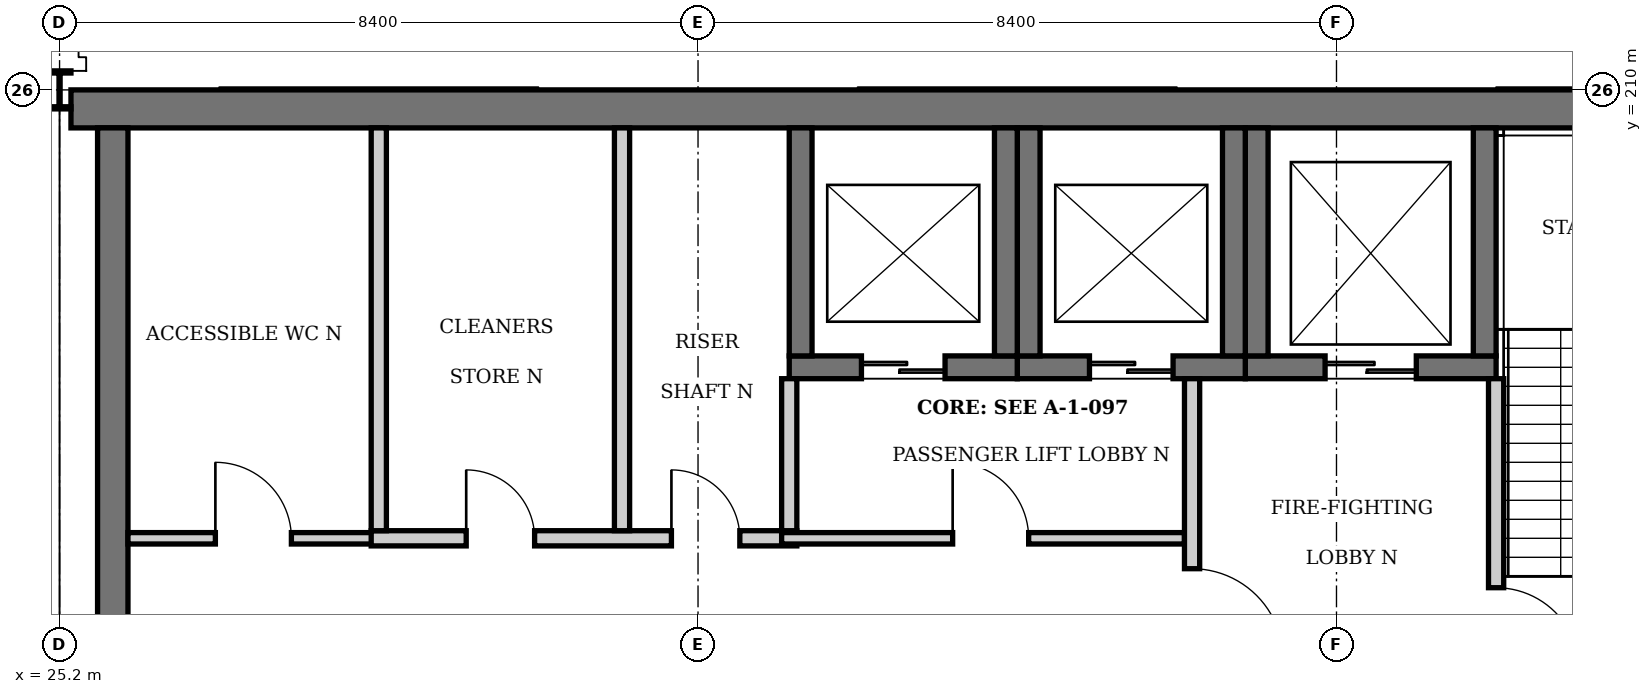
"""IFC4 building model, lengths in metres.
Left out: names, types, materials, properties, quantities, classifications, styles, units other than length and angle.
Written with IfcOpenShell. Run it as: python <this file> out.ifc"""

import sys

from ifc_helpers import new_model, si_unit, direction, frame, frame_2d, origin, origin_2d, place, context, subcontext, project, spatial, rectangle, i_section, extrude, element, fill, save


model = new_model("IFC4")
c1 = context("Model", 3, precision=1e-05, world=origin(), true_north=direction((0.0, 1.0)))
c2 = subcontext(c1, "Body", "Model", "MODEL_VIEW")
j1 = project(units=[si_unit("LENGTHUNIT", "METRE"), si_unit("PLANEANGLEUNIT", "RADIAN")], contexts=[c1])
p1 = place(None, origin())
s1 = spatial("IfcSite", under=j1, at=p1, CompositionType="ELEMENT")
p2 = place(p1, origin())
s2 = spatial("IfcBuilding", under=s1, at=p2, CompositionType="ELEMENT")
p3 = place(p2, frame((0.0, 0.0, 6.0)))
s3 = spatial("IfcBuildingStorey", under=s2, at=p3, CompositionType="ELEMENT", Elevation=6.0)
p4 = place(p3, frame((25.2, 210.0, 0.0), z_axis=(0.0, 0.0, 1.0), x_axis=(1.0, 0.0, 0.0)))
e1 = element("IfcColumn", 1, at=p4, inside=s3, PredefinedType="COLUMN", context=c2, shape_type="SweptSolid", body=[
    extrude(i_section(OverallWidth=0.3, OverallDepth=0.5, WebThickness=0.014, FlangeThickness=0.028, at=origin_2d()), origin(), (0.0, 0.0, 1.0), 4.8),
])
p5 = place(p3, frame((25.35, 209.75, 0.0), z_axis=(0.0, 0.0, 1.0), x_axis=(1.0, 0.0, 0.0)))
e2 = element("IfcWall", 2, at=p5, inside=s3, PredefinedType="SHEAR", context=c2, shape_type="SweptSolid", body=[
    extrude(rectangle(XDim=25.043, YDim=0.5, at=frame_2d((12.521, 0.0))), origin(), (0.0, 0.0, 1.0), 4.8),
])
p6 = place(p3, frame((25.9, 202.1, 0.0), z_axis=(0.0, 0.0, 1.0), x_axis=(0.0, 1.0, 0.0)))
e3 = element("IfcWall", 3, at=p6, inside=s3, PredefinedType="SHEAR", context=c2, shape_type="SweptSolid", body=[
    extrude(rectangle(XDim=7.4, YDim=0.4, at=frame_2d((3.7, 0.0))), origin(), (0.0, 0.0, 1.0), 4.8),
])
p7 = place(p3, frame((40.8, 206.35, 0.0), z_axis=(0.0, 0.0, 1.0), x_axis=(1.0, 0.0, 0.0)))
e4 = element("IfcWall", 4, at=p7, inside=s3, PredefinedType="SHEAR", context=c2, shape_type="SweptSolid", body=[
    extrude(rectangle(XDim=3.3, YDim=0.3, at=frame_2d((1.65, 0.0))), origin(), (0.0, 0.0, 1.0), 4.8),
])
p8 = place(p7, frame((1.05, 0.0, 0.0)))
e5 = element("IfcOpeningElement", 5, at=p8, cuts=e4, PredefinedType="OPENING", context=c2, shape_type="SweptSolid", body=[
    extrude(rectangle(XDim=1.2, YDim=2.1, at=frame_2d((0.6, 1.05))), frame((0.0, 0.16, 0.0), z_axis=(0.0, -1.0, 0.0), x_axis=(1.0, 0.0, 0.0)), (0.0, 0.0, 1.0), 0.32),
])
for number, where, z_axis, x_axis in (
    (6, (43.95, 206.5, 0.0), (0.0, 0.0, 1.0), (0.0, 1.0, 0.0)),
    (7, (40.95, 206.5, 0.0), (0.0, 0.0, 1.0), (0.0, 1.0, 0.0)),
):
    element("IfcWall", number, at=place(p3, frame(where, z_axis=z_axis, x_axis=x_axis)), inside=s3, PredefinedType="SHEAR", context=c2, shape_type="SweptSolid", body=[
        extrude(rectangle(XDim=3.0, YDim=0.3, at=frame_2d((1.5, 0.0))), origin(), (0.0, 0.0, 1.0), 4.8),
    ])
p9 = place(p3, frame((37.8, 206.35, 0.0), z_axis=(0.0, 0.0, 1.0), x_axis=(1.0, 0.0, 0.0)))
e8 = element("IfcWall", 8, at=p9, inside=s3, PredefinedType="SHEAR", context=c2, shape_type="SweptSolid", body=[
    extrude(rectangle(XDim=3.0, YDim=0.3, at=frame_2d((1.5, 0.0))), origin(), (0.0, 0.0, 1.0), 4.8),
])
p10 = place(p9, frame((0.95, 0.0, 0.0)))
e9 = element("IfcOpeningElement", 9, at=p10, cuts=e8, PredefinedType="OPENING", context=c2, shape_type="SweptSolid", body=[
    extrude(rectangle(XDim=1.1, YDim=2.1, at=frame_2d((0.55, 1.05))), frame((0.0, 0.16, 0.0), z_axis=(0.0, -1.0, 0.0), x_axis=(1.0, 0.0, 0.0)), (0.0, 0.0, 1.0), 0.32),
])
for number, where, z_axis, x_axis in (
    (10, (40.65, 206.5, 0.0), (0.0, 0.0, 1.0), (0.0, 1.0, 0.0)),
    (11, (37.95, 206.5, 0.0), (0.0, 0.0, 1.0), (0.0, 1.0, 0.0)),
):
    element("IfcWall", number, at=place(p3, frame(where, z_axis=z_axis, x_axis=x_axis)), inside=s3, PredefinedType="SHEAR", context=c2, shape_type="SweptSolid", body=[
        extrude(rectangle(XDim=3.0, YDim=0.3, at=frame_2d((1.5, 0.0))), origin(), (0.0, 0.0, 1.0), 4.8),
    ])
p11 = place(p3, frame((34.8, 206.35, 0.0), z_axis=(0.0, 0.0, 1.0), x_axis=(1.0, 0.0, 0.0)))
e12 = element("IfcWall", 12, at=p11, inside=s3, PredefinedType="SHEAR", context=c2, shape_type="SweptSolid", body=[
    extrude(rectangle(XDim=3.0, YDim=0.3, at=frame_2d((1.5, 0.0))), origin(), (0.0, 0.0, 1.0), 4.8),
])
p12 = place(p11, frame((0.95, 0.0, 0.0)))
e13 = element("IfcOpeningElement", 13, at=p12, cuts=e12, PredefinedType="OPENING", context=c2, shape_type="SweptSolid", body=[
    extrude(rectangle(XDim=1.1, YDim=2.1, at=frame_2d((0.55, 1.05))), frame((0.0, 0.16, 0.0), z_axis=(0.0, -1.0, 0.0), x_axis=(1.0, 0.0, 0.0)), (0.0, 0.0, 1.0), 0.32),
])
for number, where, z_axis, x_axis in (
    (14, (37.65, 206.5, 0.0), (0.0, 0.0, 1.0), (0.0, 1.0, 0.0)),
    (15, (34.95, 206.5, 0.0), (0.0, 0.0, 1.0), (0.0, 1.0, 0.0)),
):
    element("IfcWall", number, at=place(p3, frame(where, z_axis=z_axis, x_axis=x_axis)), inside=s3, PredefinedType="SHEAR", context=c2, shape_type="SweptSolid", body=[
        extrude(rectangle(XDim=3.0, YDim=0.3, at=frame_2d((1.5, 0.0))), origin(), (0.0, 0.0, 1.0), 4.8),
    ])
p13 = place(p3, frame((26.1, 204.1, 0.0), z_axis=(0.0, 0.0, 1.0), x_axis=(1.0, 0.0, 0.0)))
e16 = element("IfcWall", 16, at=p13, inside=s3, PredefinedType="PARTITIONING", context=c2, shape_type="SweptSolid", body=[
    extrude(rectangle(XDim=3.4, YDim=0.15, at=frame_2d((1.7, 0.0))), origin(), (0.0, 0.0, 1.0), 4.55),
])
p14 = place(p13, frame((1.15, 0.0, 0.0)))
e17 = element("IfcOpeningElement", 17, at=p14, cuts=e16, PredefinedType="OPENING", context=c2, shape_type="SweptSolid", body=[
    extrude(rectangle(XDim=1.0, YDim=2.1, at=frame_2d((0.5, 1.05))), frame((0.0, 0.085, 0.0), z_axis=(0.0, -1.0, 0.0), x_axis=(1.0, 0.0, 0.0)), (0.0, 0.0, 1.0), 0.17),
])
p15 = place(p3, frame((29.3, 204.1, 0.0), z_axis=(0.0, 0.0, 1.0), x_axis=(1.0, 0.0, 0.0)))
e18 = element("IfcWall", 18, at=p15, inside=s3, PredefinedType="PARTITIONING", context=c2, shape_type="SweptSolid", body=[
    extrude(rectangle(XDim=5.6, YDim=0.2, at=frame_2d((2.8, 0.0))), origin(), (0.0, 0.0, 1.0), 4.55),
])
p16 = place(p15, frame((3.95, 0.0, 0.0)))
e19 = element("IfcOpeningElement", 19, at=p16, cuts=e18, PredefinedType="OPENING", context=c2, shape_type="SweptSolid", body=[
    extrude(rectangle(XDim=0.9, YDim=2.1, at=frame_2d((0.45, 1.05))), frame((0.0, 0.11, 0.0), z_axis=(0.0, -1.0, 0.0), x_axis=(1.0, 0.0, 0.0)), (0.0, 0.0, 1.0), 0.22),
])
p17 = place(p15, frame((1.25, 0.0, 0.0)))
e20 = element("IfcOpeningElement", 20, at=p17, cuts=e18, PredefinedType="OPENING", context=c2, shape_type="SweptSolid", body=[
    extrude(rectangle(XDim=0.9, YDim=2.1, at=frame_2d((0.45, 1.05))), frame((0.0, 0.11, 0.0), z_axis=(0.0, -1.0, 0.0), x_axis=(1.0, 0.0, 0.0)), (0.0, 0.0, 1.0), 0.22),
])
p18 = place(p3, frame((34.7, 204.1, 0.0), z_axis=(0.0, 0.0, 1.0), x_axis=(1.0, 0.0, 0.0)))
e21 = element("IfcWall", 21, at=p18, inside=s3, PredefinedType="PARTITIONING", context=c2, shape_type="SweptSolid", body=[
    extrude(rectangle(XDim=5.3, YDim=0.15, at=frame_2d((2.65, 0.0))), origin(), (0.0, 0.0, 1.0), 4.55),
])
p19 = place(p18, frame((2.25, 0.0, 0.0)))
e22 = element("IfcOpeningElement", 22, at=p19, cuts=e21, PredefinedType="OPENING", context=c2, shape_type="SweptSolid", body=[
    extrude(rectangle(XDim=1.0, YDim=2.1, at=frame_2d((0.5, 1.05))), frame((0.0, 0.085, 0.0), z_axis=(0.0, -1.0, 0.0), x_axis=(1.0, 0.0, 0.0)), (0.0, 0.0, 1.0), 0.17),
])
for number, where, z_axis, x_axis in (
    (23, (29.4, 204.2, 0.0), (0.0, 0.0, 1.0), (0.0, 1.0, 0.0)),
    (24, (32.6, 204.2, 0.0), (0.0, 0.0, 1.0), (0.0, 1.0, 0.0)),
):
    element("IfcWall", number, at=place(p3, frame(where, z_axis=z_axis, x_axis=x_axis)), inside=s3, PredefinedType="PARTITIONING", context=c2, shape_type="SweptSolid", body=[
        extrude(rectangle(XDim=5.3, YDim=0.2, at=frame_2d((2.65, 0.0))), origin(), (0.0, 0.0, 1.0), 4.55),
    ])
p20 = place(p3, frame((34.8, 204.2, 0.0), z_axis=(0.0, 0.0, 1.0), x_axis=(0.0, 1.0, 0.0)))
e25 = element("IfcWall", 25, at=p20, inside=s3, PredefinedType="PARTITIONING", context=c2, shape_type="SweptSolid", body=[
    extrude(rectangle(XDim=2.0, YDim=0.2, at=frame_2d((1.0, 0.0))), origin(), (0.0, 0.0, 1.0), 4.55),
])
p21 = place(p3, frame((40.1, 202.1, 0.0), z_axis=(0.0, 0.0, 1.0), x_axis=(0.0, 1.0, 0.0)))
e26 = element("IfcWall", 26, at=p21, inside=s3, PredefinedType="PARTITIONING", context=c2, shape_type="SweptSolid", body=[
    extrude(rectangle(XDim=4.1, YDim=0.2, at=frame_2d((2.05, 0.0))), origin(), (0.0, 0.0, 1.0), 4.55),
])
p22 = place(p21, frame((0.4, 0.0, 0.0)))
e27 = element("IfcOpeningElement", 27, at=p22, cuts=e26, PredefinedType="OPENING", context=c2, shape_type="SweptSolid", body=[
    extrude(rectangle(XDim=1.2, YDim=2.4, at=frame_2d((0.6, 1.2))), frame((0.0, 0.11, 0.0), z_axis=(0.0, -1.0, 0.0), x_axis=(1.0, 0.0, 0.0)), (0.0, 0.0, 1.0), 0.22),
])
p23 = place(p3, frame((44.1, 202.1, 0.0), z_axis=(0.0, 0.0, 1.0), x_axis=(0.0, 1.0, 0.0)))
e28 = element("IfcWall", 28, at=p23, inside=s3, PredefinedType="PARTITIONING", context=c2, shape_type="SweptSolid", body=[
    extrude(rectangle(XDim=4.1, YDim=0.2, at=frame_2d((2.05, 0.0))), origin(), (0.0, 0.0, 1.0), 4.55),
])
p24 = place(p23, frame((0.25, 0.0, 0.0)))
e29 = element("IfcOpeningElement", 29, at=p24, cuts=e28, PredefinedType="OPENING", context=c2, shape_type="SweptSolid", body=[
    extrude(rectangle(XDim=1.1, YDim=2.4, at=frame_2d((0.55, 1.2))), frame((0.0, 0.11, 0.0), z_axis=(0.0, -1.0, 0.0), x_axis=(1.0, 0.0, 0.0)), (0.0, 0.0, 1.0), 0.22),
])
p25 = place(p19, origin())
e30 = element("IfcDoor", 30, at=p25, inside=s3, OperationType="SINGLE_SWING_LEFT", PredefinedType="DOOR", context=c2, shape_type="SweptSolid", body=[
    extrude(rectangle(XDim=1.0, YDim=2.1, at=frame_2d((0.5, 1.05))), frame((0.0, 0.025, 0.0), z_axis=(0.0, -1.0, 0.0), x_axis=(1.0, 0.0, 0.0)), (0.0, 0.0, 1.0), 0.05),
])
fill(e22, e30)
p26 = place(p22, frame((1.2, 0.0, 0.0), z_axis=(0.0, 0.0, 1.0), x_axis=(-1.0, 0.0, 0.0)))
e31 = element("IfcDoor", 31, at=p26, inside=s3, OperationType="SINGLE_SWING_RIGHT", PredefinedType="DOOR", context=c2, shape_type="SweptSolid", body=[
    extrude(rectangle(XDim=1.2, YDim=2.4, at=frame_2d((0.6, 1.2))), frame((0.0, 0.025, 0.0), z_axis=(0.0, -1.0, 0.0), x_axis=(1.0, 0.0, 0.0)), (0.0, 0.0, 1.0), 0.05),
])
fill(e27, e31)
p27 = place(p16, origin())
e32 = element("IfcDoor", 32, at=p27, inside=s3, OperationType="SINGLE_SWING_LEFT", PredefinedType="DOOR", context=c2, shape_type="SweptSolid", body=[
    extrude(rectangle(XDim=0.9, YDim=2.1, at=frame_2d((0.45, 1.05))), frame((0.0, 0.025, 0.0), z_axis=(0.0, -1.0, 0.0), x_axis=(1.0, 0.0, 0.0)), (0.0, 0.0, 1.0), 0.05),
])
fill(e19, e32)
p28 = place(p17, origin())
e33 = element("IfcDoor", 33, at=p28, inside=s3, OperationType="SINGLE_SWING_LEFT", PredefinedType="DOOR", context=c2, shape_type="SweptSolid", body=[
    extrude(rectangle(XDim=0.9, YDim=2.1, at=frame_2d((0.45, 1.05))), frame((0.0, 0.025, 0.0), z_axis=(0.0, -1.0, 0.0), x_axis=(1.0, 0.0, 0.0)), (0.0, 0.0, 1.0), 0.05),
])
fill(e20, e33)
p29 = place(p14, origin())
e34 = element("IfcDoor", 34, at=p29, inside=s3, OperationType="SINGLE_SWING_LEFT", PredefinedType="DOOR", context=c2, shape_type="SweptSolid", body=[
    extrude(rectangle(XDim=1.0, YDim=2.1, at=frame_2d((0.5, 1.05))), frame((0.0, 0.025, 0.0), z_axis=(0.0, -1.0, 0.0), x_axis=(1.0, 0.0, 0.0)), (0.0, 0.0, 1.0), 0.05),
])
fill(e17, e34)
p30 = place(p24, frame((1.1, 0.0, 0.0), z_axis=(0.0, 0.0, 1.0), x_axis=(-1.0, 0.0, 0.0)))
e35 = element("IfcDoor", 35, at=p30, inside=s3, OperationType="SINGLE_SWING_RIGHT", PredefinedType="DOOR", context=c2, shape_type="SweptSolid", body=[
    extrude(rectangle(XDim=1.1, YDim=2.4, at=frame_2d((0.55, 1.2))), frame((0.0, 0.025, 0.0), z_axis=(0.0, -1.0, 0.0), x_axis=(1.0, 0.0, 0.0)), (0.0, 0.0, 1.0), 0.05),
])
fill(e29, e35)
p31 = place(p8, origin())
e36 = element("IfcDoor", 36, at=p31, inside=s3, OperationType="SLIDING_TO_LEFT", PredefinedType="DOOR", context=c2, shape_type="SweptSolid", body=[
    extrude(rectangle(XDim=1.2, YDim=2.1, at=frame_2d((0.6, 1.05))), frame((0.0, 0.025, 0.0), z_axis=(0.0, -1.0, 0.0), x_axis=(1.0, 0.0, 0.0)), (0.0, 0.0, 1.0), 0.05),
])
fill(e5, e36)
p32 = place(p10, origin())
e37 = element("IfcDoor", 37, at=p32, inside=s3, OperationType="SLIDING_TO_LEFT", PredefinedType="DOOR", context=c2, shape_type="SweptSolid", body=[
    extrude(rectangle(XDim=1.1, YDim=2.1, at=frame_2d((0.55, 1.05))), frame((0.0, 0.025, 0.0), z_axis=(0.0, -1.0, 0.0), x_axis=(1.0, 0.0, 0.0)), (0.0, 0.0, 1.0), 0.05),
])
fill(e9, e37)
p33 = place(p12, origin())
e38 = element("IfcDoor", 38, at=p33, inside=s3, OperationType="SLIDING_TO_LEFT", PredefinedType="DOOR", context=c2, shape_type="SweptSolid", body=[
    extrude(rectangle(XDim=1.1, YDim=2.1, at=frame_2d((0.55, 1.05))), frame((0.0, 0.025, 0.0), z_axis=(0.0, -1.0, 0.0), x_axis=(1.0, 0.0, 0.0)), (0.0, 0.0, 1.0), 0.05),
])
fill(e13, e38)
save(model, sys.argv[1])
